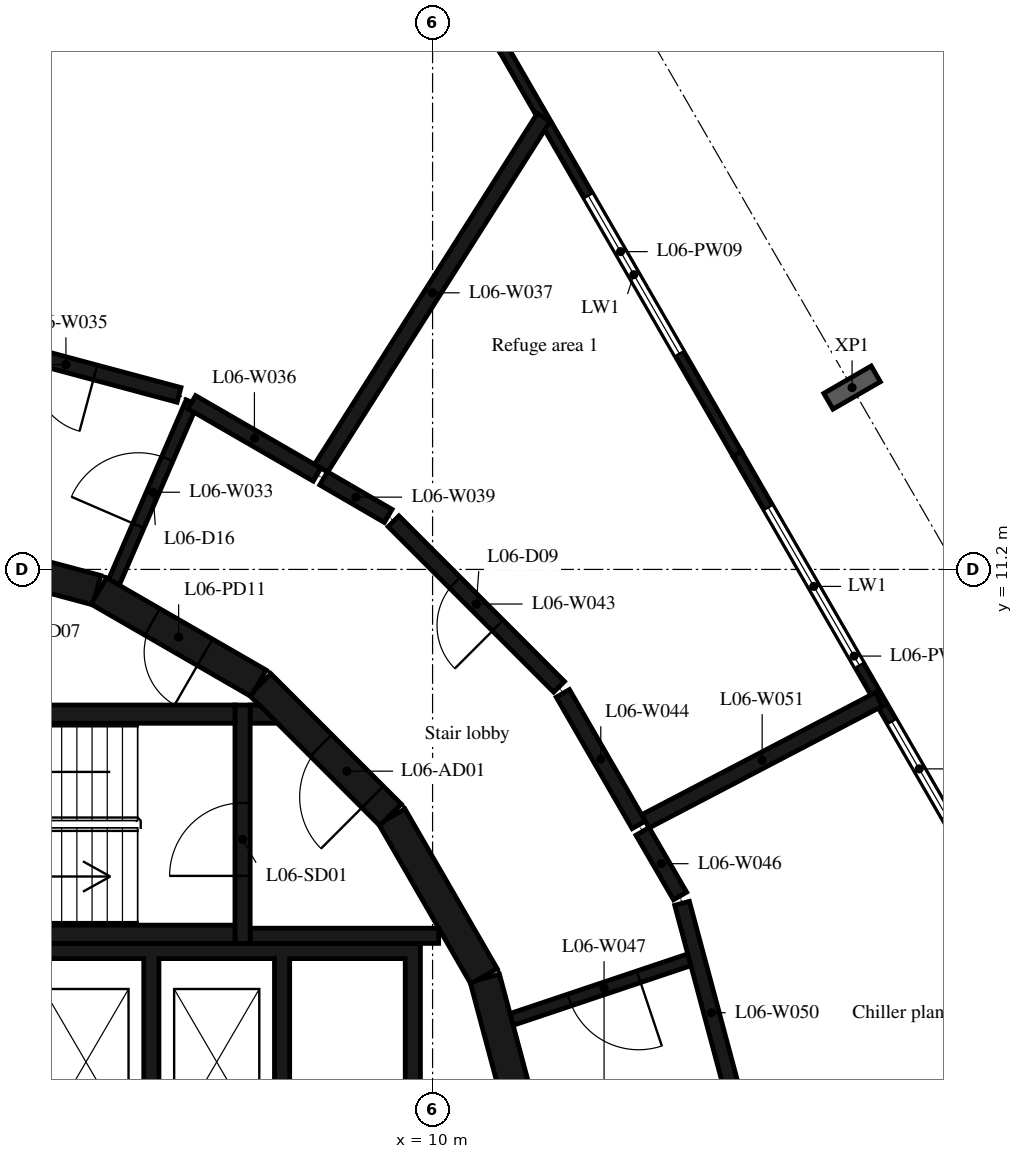
"""IFC4 building model, lengths in metres.
Left out: names, types, materials, properties, quantities, classifications, styles, units other than length and angle.
Written with IfcOpenShell. Run it as: python <this file> out.ifc"""

import sys

from ifc_helpers import new_model, si_unit, direction, frame, frame_2d, origin, origin_2d, place, context, subcontext, project, spatial, polyline, rectangle, i_section, outline, extrude, element, fill, save


model = new_model("IFC4")
c1 = context("Model", 3, precision=1e-05, world=origin(), true_north=direction((0.0, 1.0)))
c2 = subcontext(c1, "Body", "Model", "MODEL_VIEW")
j1 = project(units=[si_unit("LENGTHUNIT", "METRE"), si_unit("PLANEANGLEUNIT", "RADIAN")], contexts=[c1])
p1 = place(None, origin())
s1 = spatial("IfcSite", under=j1, at=p1, CompositionType="ELEMENT")
p2 = place(p1, origin())
s2 = spatial("IfcBuilding", under=s1, at=p2, CompositionType="ELEMENT")
p3 = place(p2, frame((0.0, 0.0, 33.0)))
s3 = spatial("IfcBuildingStorey", under=s2, at=p3, CompositionType="ELEMENT", Elevation=33.0)
p4 = place(p3, frame((16.899, 14.19, -0.45), z_axis=(0.0, 0.0, 1.0), x_axis=(0.50000017485, -0.866025302835, 0.0)))
e1 = element("IfcColumn", 1, at=p4, inside=s3, PredefinedType="COLUMN", context=c2, shape_type="SweptSolid", body=[
    extrude(i_section(OverallWidth=0.3, OverallDepth=0.9, WebThickness=0.019, FlangeThickness=0.035, FilletRadius=0.03, at=origin_2d()), origin(), (0.0, 0.0, 1.0), 5.4),
])
p5 = place(p3, frame((18.851, 6.449, 0.0), z_axis=(0.0, 0.0, 1.0), x_axis=(-0.500005879718, 0.866022009101, 0.0)))
e2 = element("IfcWall", 2, at=p5, inside=s3, PredefinedType="STANDARD", context=c2, shape_type="SweptSolid", body=[
    extrude(rectangle(XDim=7.68, YDim=0.16, at=frame_2d((3.84, 0.0))), origin(), (0.0, 0.0, 1.0), 4.95),
])
p6 = place(p5, frame((0.798, 0.0, 1.0)))
e3 = element("IfcOpeningElement", 3, at=p6, cuts=e2, PredefinedType="OPENING", context=c2, shape_type="SweptSolid", body=[
    extrude(rectangle(XDim=1.8, YDim=2.2, at=frame_2d((0.9, 1.1))), frame((0.0, 0.09, 0.0), z_axis=(0.0, -1.0, 0.0), x_axis=(1.0, 0.0, 0.0)), (0.0, 0.0, 1.0), 0.18),
])
p7 = place(p5, frame((3.663, 0.0, 1.0)))
e4 = element("IfcOpeningElement", 4, at=p7, cuts=e2, PredefinedType="OPENING", context=c2, shape_type="SweptSolid", body=[
    extrude(rectangle(XDim=3.0, YDim=2.2, at=frame_2d((1.5, 1.1))), frame((0.0, 0.09, 0.0), z_axis=(0.0, -1.0, 0.0), x_axis=(1.0, 0.0, 0.0)), (0.0, 0.0, 1.0), 0.18),
])
p8 = place(p3, frame((15.011, 13.101, 0.0), z_axis=(0.0, 0.0, 1.0), x_axis=(-0.500005879718, 0.866022009101, 0.0)))
e5 = element("IfcWall", 5, at=p8, inside=s3, PredefinedType="STANDARD", context=c2, shape_type="SweptSolid", body=[
    extrude(rectangle(XDim=7.68, YDim=0.16, at=frame_2d((3.84, 0.0))), origin(), (0.0, 0.0, 1.0), 4.95),
])
p9 = place(p8, frame((1.902, 0.0, 1.0)))
e6 = element("IfcOpeningElement", 6, at=p9, cuts=e5, PredefinedType="OPENING", context=c2, shape_type="SweptSolid", body=[
    extrude(rectangle(XDim=3.0, YDim=2.2, at=frame_2d((1.5, 1.1))), frame((0.0, 0.09, 0.0), z_axis=(0.0, -1.0, 0.0), x_axis=(1.0, 0.0, 0.0)), (0.0, 0.0, 1.0), 0.18),
])
for number, where, z_axis, x_axis in (
    (7, (11.643, 1.55, 0.0), (0.0, 0.0, 1.0), (-0.259, 0.966, 0.0)),
    (8, (10.845, 4.51, 0.0), (0.0, 0.0, 1.0), (-0.5, 0.866, 0.0)),
):
    element("IfcWall", number, at=place(p3, frame(where, z_axis=z_axis, x_axis=x_axis)), inside=s3, PredefinedType="SHEAR", context=c2, shape_type="SweptSolid", body=[
        extrude(rectangle(XDim=3.033, YDim=0.5, at=frame_2d((1.516, 0.0))), origin(), (0.0, 0.0, 1.0), 4.95),
    ])
p10 = place(p3, frame((9.308, 7.164, 0.0), z_axis=(0.0, 0.0, 1.0), x_axis=(-0.707106781187, 0.707106781187, 0.0)))
e9 = element("IfcWall", 9, at=p10, inside=s3, PredefinedType="SHEAR", context=c2, shape_type="SweptSolid", body=[
    extrude(rectangle(XDim=3.032, YDim=0.5, at=frame_2d((1.516, 0.0))), origin(), (0.0, 0.0, 1.0), 4.95),
])
p11 = place(p10, frame((0.416, 0.0, 0.0)))
e10 = element("IfcOpeningElement", 10, at=p11, cuts=e9, PredefinedType="OPENING", context=c2, shape_type="SweptSolid", body=[
    extrude(rectangle(XDim=1.2, YDim=2.1, at=frame_2d((0.6, 1.05))), frame((0.0, 0.26, 0.0), z_axis=(0.0, -1.0, 0.0), x_axis=(1.0, 0.0, 0.0)), (0.0, 0.0, 1.0), 0.52),
])
p12 = place(p3, frame((7.137, 9.329, 0.0), z_axis=(0.0, 0.0, 1.0), x_axis=(-0.865975092491, 0.500087131594, 0.0)))
e11 = element("IfcWall", 11, at=p12, inside=s3, PredefinedType="SHEAR", context=c2, shape_type="SweptSolid", body=[
    extrude(rectangle(XDim=3.033, YDim=0.5, at=frame_2d((1.516, 0.0))), origin(), (0.0, 0.0, 1.0), 4.95),
])
p13 = place(p12, frame((1.016, 0.0, 0.0)))
e12 = element("IfcOpeningElement", 12, at=p13, cuts=e11, PredefinedType="OPENING", context=c2, shape_type="SweptSolid", body=[
    extrude(rectangle(XDim=1.0, YDim=2.4, at=frame_2d((0.5, 1.2))), frame((0.0, 0.26, 0.0), z_axis=(0.0, -1.0, 0.0), x_axis=(1.0, 0.0, 0.0)), (0.0, 0.0, 1.0), 0.52),
])
p14 = place(p3, frame((4.479, 10.858, 0.0), z_axis=(0.0, 0.0, 1.0), x_axis=(-0.965948410781, 0.258734743916, 0.0)))
e13 = element("IfcWall", 13, at=p14, inside=s3, PredefinedType="SHEAR", context=c2, shape_type="SweptSolid", body=[
    extrude(rectangle(XDim=3.033, YDim=0.5, at=frame_2d((1.516, 0.0))), origin(), (0.0, 0.0, 1.0), 4.95),
])
for number, where, z_axis, x_axis in (
    (14, (0.0, 5.2, 0.0), (0.0, 0.0, 1.0), (1.0, 0.0, 0.0)),
    (15, (0.0, 8.82, 0.0), (0.0, 0.0, 1.0), (1.0, 0.0, 0.0)),
):
    element("IfcWall", number, at=place(p3, frame(where, z_axis=z_axis, x_axis=x_axis)), inside=s3, PredefinedType="SHEAR", context=c2, shape_type="SweptSolid", body=[
        extrude(rectangle(XDim=6.75, YDim=0.3, at=frame_2d((3.375, 0.0))), origin(), (0.0, 0.0, 1.0), 4.95),
    ])
p15 = place(p3, frame((6.875, 5.05, 0.0), z_axis=(0.0, 0.0, 1.0), x_axis=(0.0, 1.0, 0.0)))
e16 = element("IfcWall", 16, at=p15, inside=s3, PredefinedType="SHEAR", context=c2, shape_type="SweptSolid", body=[
    extrude(rectangle(XDim=3.92, YDim=0.25, at=frame_2d((1.96, 0.0))), origin(), (0.0, 0.0, 1.0), 4.95),
])
p16 = place(p15, frame((1.11, 0.0, 0.0)))
e17 = element("IfcOpeningElement", 17, at=p16, cuts=e16, PredefinedType="OPENING", context=c2, shape_type="SweptSolid", body=[
    extrude(rectangle(XDim=1.2, YDim=2.1, at=frame_2d((0.6, 1.05))), frame((0.0, 0.135, 0.0), z_axis=(0.0, -1.0, 0.0), x_axis=(1.0, 0.0, 0.0)), (0.0, 0.0, 1.0), 0.27),
])
p17 = place(p3, frame((7.0, 5.175, 0.0), z_axis=(0.0, 0.0, 1.0), x_axis=(1.0, 0.0, 0.0)))
e18 = element("IfcWall", 18, at=p17, inside=s3, PredefinedType="SHEAR", context=c2, shape_type="SweptSolid", body=[
    extrude(rectangle(XDim=3.1, YDim=0.25, at=frame_2d((1.55, 0.0))), origin(), (0.0, 0.0, 1.0), 4.95),
])
p18 = place(p3, origin())
e19 = element("IfcWall", 19, at=p18, inside=s3, PredefinedType="SHEAR", context=c2, shape_type="SweptSolid", body=[
    extrude(outline(polyline([(7.448, 8.67), (7.0, 8.67), (7.0, 8.97), (7.148, 8.97), (7.448, 8.67)])), origin(), (0.0, 0.0, 1.0), 4.95),
])
p19 = place(p3, origin())
e20 = element("IfcWall", 20, at=p19, inside=s3, PredefinedType="SHEAR", context=c2, shape_type="SweptSolid", body=[
    extrude(outline(polyline([(-9.55, 4.8), (-7.65, 4.8), (-7.65, 1.9), (-7.4, 1.9), (-7.4, 4.8), (-5.5, 4.8), (-5.5, 1.9), (-5.25, 1.9), (-5.25, 4.8), (-3.35, 4.8), (-3.35, 1.9), (-3.1, 1.9), (-3.1, 4.8), (-1.2, 4.8), (-1.2, 1.9), (-0.95, 1.9), (-0.95, 4.8), (3.1, 4.8), (3.1, 1.9), (3.35, 1.9), (3.35, 4.8), (5.25, 4.8), (5.25, 1.9), (5.5, 1.9), (5.5, 4.8), (7.4, 4.8), (7.4, 1.9), (7.65, 1.9), (7.65, 4.8), (9.55, 4.8), (9.55, 1.9), (9.8, 1.9), (9.8, 4.8), (9.8, 5.05), (-9.8, 5.05), (-9.8, 4.8), (-9.8, 1.9), (-9.55, 1.9), (-9.55, 4.8)])), origin(), (0.0, 0.0, 1.0), 4.95),
])
p20 = place(p3, frame((4.76, 10.99, 0.0), z_axis=(0.0, 0.0, 1.0), x_axis=(0.396905977672, 0.917859272922, 0.0)))
e21 = element("IfcWall", 21, at=p20, inside=s3, PredefinedType="PARTITIONING", context=c2, shape_type="SweptSolid", body=[
    extrude(rectangle(XDim=3.224, YDim=0.2, at=frame_2d((1.612, 0.0))), origin(), (0.0, 0.0, 1.0), 4.95),
])
p21 = place(p20, frame((1.012, 0.0, 0.0)))
e22 = element("IfcOpeningElement", 22, at=p21, cuts=e21, PredefinedType="OPENING", context=c2, shape_type="SweptSolid", body=[
    extrude(rectangle(XDim=1.2, YDim=2.1, at=frame_2d((0.6, 1.05))), frame((0.0, 0.11, 0.0), z_axis=(0.0, -1.0, 0.0), x_axis=(1.0, 0.0, 0.0)), (0.0, 0.0, 1.0), 0.22),
])
p22 = place(p3, frame((5.83, 14.07, 0.0), z_axis=(0.0, 0.0, 1.0), x_axis=(-0.965861411942, 0.259059323171, 0.0)))
e23 = element("IfcWall", 23, at=p22, inside=s3, PredefinedType="PARTITIONING", context=c2, shape_type="SweptSolid", body=[
    extrude(rectangle(XDim=3.851, YDim=0.25, at=frame_2d((1.925, 0.0))), origin(), (0.0, 0.0, 1.0), 4.95),
])
p23 = place(p22, frame((1.425, 0.0, 0.0)))
e24 = element("IfcOpeningElement", 24, at=p23, cuts=e23, PredefinedType="OPENING", context=c2, shape_type="SweptSolid", body=[
    extrude(rectangle(XDim=1.0, YDim=2.1, at=frame_2d((0.5, 1.05))), frame((0.0, 0.135, 0.0), z_axis=(0.0, -1.0, 0.0), x_axis=(1.0, 0.0, 0.0)), (0.0, 0.0, 1.0), 0.27),
])
p24 = place(p3, frame((6.04, 13.95, 0.0), z_axis=(0.0, 0.0, 1.0), x_axis=(0.865922362496, -0.500178430292, 0.0)))
e25 = element("IfcWall", 25, at=p24, inside=s3, PredefinedType="PARTITIONING", context=c2, shape_type="SweptSolid", body=[
    extrude(rectangle(XDim=2.379, YDim=0.25, at=frame_2d((1.189, 0.0))), origin(), (0.0, 0.0, 1.0), 4.95),
])
p25 = place(p3, frame((8.167, 12.865, 0.0), z_axis=(0.0, 0.0, 1.0), x_axis=(0.535852860109, 0.844311383503, 0.0)))
e26 = element("IfcWall", 26, at=p25, inside=s3, PredefinedType="PARTITIONING", context=c2, shape_type="SweptSolid", body=[
    extrude(rectangle(XDim=6.831, YDim=0.25, at=frame_2d((3.415, 0.0))), origin(), (0.0, 0.0, 1.0), 4.95),
])
p26 = place(p3, frame((9.27, 12.08, 0.0), z_axis=(0.0, 0.0, 1.0), x_axis=(-0.864599561852, 0.502461538474, 0.0)))
e27 = element("IfcWall", 27, at=p26, inside=s3, PredefinedType="PARTITIONING", context=c2, shape_type="SweptSolid", body=[
    extrude(rectangle(XDim=1.228, YDim=0.25, at=frame_2d((0.614, 0.0))), origin(), (0.0, 0.0, 1.0), 4.95),
])
p27 = place(p3, frame((12.08, 9.27, 0.0), z_axis=(0.0, 0.0, 1.0), x_axis=(-0.707106781187, 0.707106781187, 0.0)))
e28 = element("IfcWall", 28, at=p27, inside=s3, PredefinedType="PARTITIONING", context=c2, shape_type="SweptSolid", body=[
    extrude(rectangle(XDim=3.849, YDim=0.25, at=frame_2d((1.925, 0.0))), origin(), (0.0, 0.0, 1.0), 4.95),
])
p28 = place(p27, frame((1.425, 0.0, 0.0)))
e29 = element("IfcOpeningElement", 29, at=p28, cuts=e28, PredefinedType="OPENING", context=c2, shape_type="SweptSolid", body=[
    extrude(rectangle(XDim=1.0, YDim=2.1, at=frame_2d((0.5, 1.05))), frame((0.0, 0.135, 0.0), z_axis=(0.0, -1.0, 0.0), x_axis=(1.0, 0.0, 0.0)), (0.0, 0.0, 1.0), 0.27),
])
p29 = place(p3, frame((13.39, 7.0, 0.0), z_axis=(0.0, 0.0, 1.0), x_axis=(-0.499790202325, 0.86614649665, 0.0)))
e30 = element("IfcWall", 30, at=p29, inside=s3, PredefinedType="PARTITIONING", context=c2, shape_type="SweptSolid", body=[
    extrude(rectangle(XDim=2.496, YDim=0.25, at=frame_2d((1.248, 0.0))), origin(), (0.0, 0.0, 1.0), 4.95),
])
p30 = place(p3, frame((14.07, 5.83, 0.0), z_axis=(0.0, 0.0, 1.0), x_axis=(-0.502547897079, 0.864549368828, 0.0)))
e31 = element("IfcWall", 31, at=p30, inside=s3, PredefinedType="PARTITIONING", context=c2, shape_type="SweptSolid", body=[
    extrude(rectangle(XDim=1.228, YDim=0.25, at=frame_2d((0.614, 0.0))), origin(), (0.0, 0.0, 1.0), 4.95),
])
p31 = place(p3, frame((14.34, 4.82, 0.0), z_axis=(0.0, 0.0, 1.0), x_axis=(-0.94805712629, -0.318100118345, 0.0)))
e32 = element("IfcWall", 32, at=p31, inside=s3, PredefinedType="PARTITIONING", context=c2, shape_type="SweptSolid", body=[
    extrude(rectangle(XDim=3.207, YDim=0.2, at=frame_2d((1.603, 0.0))), origin(), (0.0, 0.0, 1.0), 4.95),
])
p32 = place(p31, frame((1.003, 0.0, 0.0)))
e33 = element("IfcOpeningElement", 33, at=p32, cuts=e32, PredefinedType="OPENING", context=c2, shape_type="SweptSolid", body=[
    extrude(rectangle(XDim=1.2, YDim=2.1, at=frame_2d((0.6, 1.05))), frame((0.0, 0.11, 0.0), z_axis=(0.0, -1.0, 0.0), x_axis=(1.0, 0.0, 0.0)), (0.0, 0.0, 1.0), 0.22),
])
p33 = place(p3, frame((15.068, 2.111, 0.0), z_axis=(0.0, 0.0, 1.0), x_axis=(-0.259106201401, 0.965848837239, 0.0)))
e34 = element("IfcWall", 34, at=p33, inside=s3, PredefinedType="PARTITIONING", context=c2, shape_type="SweptSolid", body=[
    extrude(rectangle(XDim=3.726, YDim=0.25, at=frame_2d((1.863, 0.0))), origin(), (0.0, 0.0, 1.0), 4.95),
])
p34 = place(p3, frame((17.339, 9.063, 0.0), z_axis=(0.0, 0.0, 1.0), x_axis=(-0.886348502882, -0.463018716078, 0.0)))
e35 = element("IfcWall", 35, at=p34, inside=s3, PredefinedType="PARTITIONING", context=c2, shape_type="SweptSolid", body=[
    extrude(rectangle(XDim=4.331, YDim=0.25, at=frame_2d((2.165, 0.0))), origin(), (0.0, 0.0, 1.0), 4.95),
])
p35 = place(p6, origin())
e36 = element("IfcWindow", 36, at=p35, inside=s3, PartitioningType="SINGLE_PANEL", PredefinedType="WINDOW", context=c2, shape_type="SweptSolid", body=[
    extrude(rectangle(XDim=1.8, YDim=2.2, at=frame_2d((0.9, 1.1))), frame((0.0, 0.03, 0.0), z_axis=(0.0, -1.0, 0.0), x_axis=(1.0, 0.0, 0.0)), (0.0, 0.0, 1.0), 0.06),
])
fill(e3, e36)
p36 = place(p7, origin())
e37 = element("IfcWindow", 37, at=p36, inside=s3, PartitioningType="SINGLE_PANEL", PredefinedType="WINDOW", context=c2, shape_type="SweptSolid", body=[
    extrude(rectangle(XDim=3.0, YDim=2.2, at=frame_2d((1.5, 1.1))), frame((0.0, 0.03, 0.0), z_axis=(0.0, -1.0, 0.0), x_axis=(1.0, 0.0, 0.0)), (0.0, 0.0, 1.0), 0.06),
])
fill(e4, e37)
p37 = place(p9, origin())
e38 = element("IfcWindow", 38, at=p37, inside=s3, PartitioningType="SINGLE_PANEL", PredefinedType="WINDOW", context=c2, shape_type="SweptSolid", body=[
    extrude(rectangle(XDim=3.0, YDim=2.2, at=frame_2d((1.5, 1.1))), frame((0.0, 0.03, 0.0), z_axis=(0.0, -1.0, 0.0), x_axis=(1.0, 0.0, 0.0)), (0.0, 0.0, 1.0), 0.06),
])
fill(e6, e38)
p38 = place(p16, origin())
e39 = element("IfcDoor", 39, at=p38, inside=s3, OperationType="SINGLE_SWING_LEFT", PredefinedType="DOOR", context=c2, shape_type="SweptSolid", body=[
    extrude(rectangle(XDim=1.2, YDim=2.1, at=frame_2d((0.6, 1.05))), frame((0.0, 0.025, 0.0), z_axis=(0.0, -1.0, 0.0), x_axis=(1.0, 0.0, 0.0)), (0.0, 0.0, 1.0), 0.05),
])
fill(e17, e39)
p39 = place(p11, origin())
e40 = element("IfcDoor", 40, at=p39, inside=s3, OperationType="SINGLE_SWING_RIGHT", PredefinedType="DOOR", context=c2, shape_type="SweptSolid", body=[
    extrude(rectangle(XDim=1.2, YDim=2.1, at=frame_2d((0.6, 1.05))), frame((0.0, 0.025, 0.0), z_axis=(0.0, -1.0, 0.0), x_axis=(1.0, 0.0, 0.0)), (0.0, 0.0, 1.0), 0.05),
])
fill(e10, e40)
p40 = place(p13, origin())
e41 = element("IfcDoor", 41, at=p40, inside=s3, OperationType="SINGLE_SWING_RIGHT", PredefinedType="DOOR", context=c2, shape_type="SweptSolid", body=[
    extrude(rectangle(XDim=1.0, YDim=2.4, at=frame_2d((0.5, 1.2))), frame((0.0, 0.025, 0.0), z_axis=(0.0, -1.0, 0.0), x_axis=(1.0, 0.0, 0.0)), (0.0, 0.0, 1.0), 0.05),
])
fill(e12, e41)
p41 = place(p28, origin())
e42 = element("IfcDoor", 42, at=p41, inside=s3, OperationType="SINGLE_SWING_LEFT", PredefinedType="DOOR", context=c2, shape_type="SweptSolid", body=[
    extrude(rectangle(XDim=1.0, YDim=2.1, at=frame_2d((0.5, 1.05))), frame((0.0, 0.025, 0.0), z_axis=(0.0, -1.0, 0.0), x_axis=(1.0, 0.0, 0.0)), (0.0, 0.0, 1.0), 0.05),
])
fill(e29, e42)
p42 = place(p23, origin())
e43 = element("IfcDoor", 43, at=p42, inside=s3, OperationType="SINGLE_SWING_LEFT", PredefinedType="DOOR", context=c2, shape_type="SweptSolid", body=[
    extrude(rectangle(XDim=1.0, YDim=2.1, at=frame_2d((0.5, 1.05))), frame((0.0, 0.025, 0.0), z_axis=(0.0, -1.0, 0.0), x_axis=(1.0, 0.0, 0.0)), (0.0, 0.0, 1.0), 0.05),
])
fill(e24, e43)
p43 = place(p21, origin())
e44 = element("IfcDoor", 44, at=p43, inside=s3, OperationType="SINGLE_SWING_LEFT", PredefinedType="DOOR", context=c2, shape_type="SweptSolid", body=[
    extrude(rectangle(XDim=1.2, YDim=2.1, at=frame_2d((0.6, 1.05))), frame((0.0, 0.025, 0.0), z_axis=(0.0, -1.0, 0.0), x_axis=(1.0, 0.0, 0.0)), (0.0, 0.0, 1.0), 0.05),
])
fill(e22, e44)
p44 = place(p32, origin())
e45 = element("IfcDoor", 45, at=p44, inside=s3, OperationType="SINGLE_SWING_LEFT", PredefinedType="DOOR", context=c2, shape_type="SweptSolid", body=[
    extrude(rectangle(XDim=1.2, YDim=2.1, at=frame_2d((0.6, 1.05))), frame((0.0, 0.025, 0.0), z_axis=(0.0, -1.0, 0.0), x_axis=(1.0, 0.0, 0.0)), (0.0, 0.0, 1.0), 0.05),
])
fill(e33, e45)
save(model, sys.argv[1])
